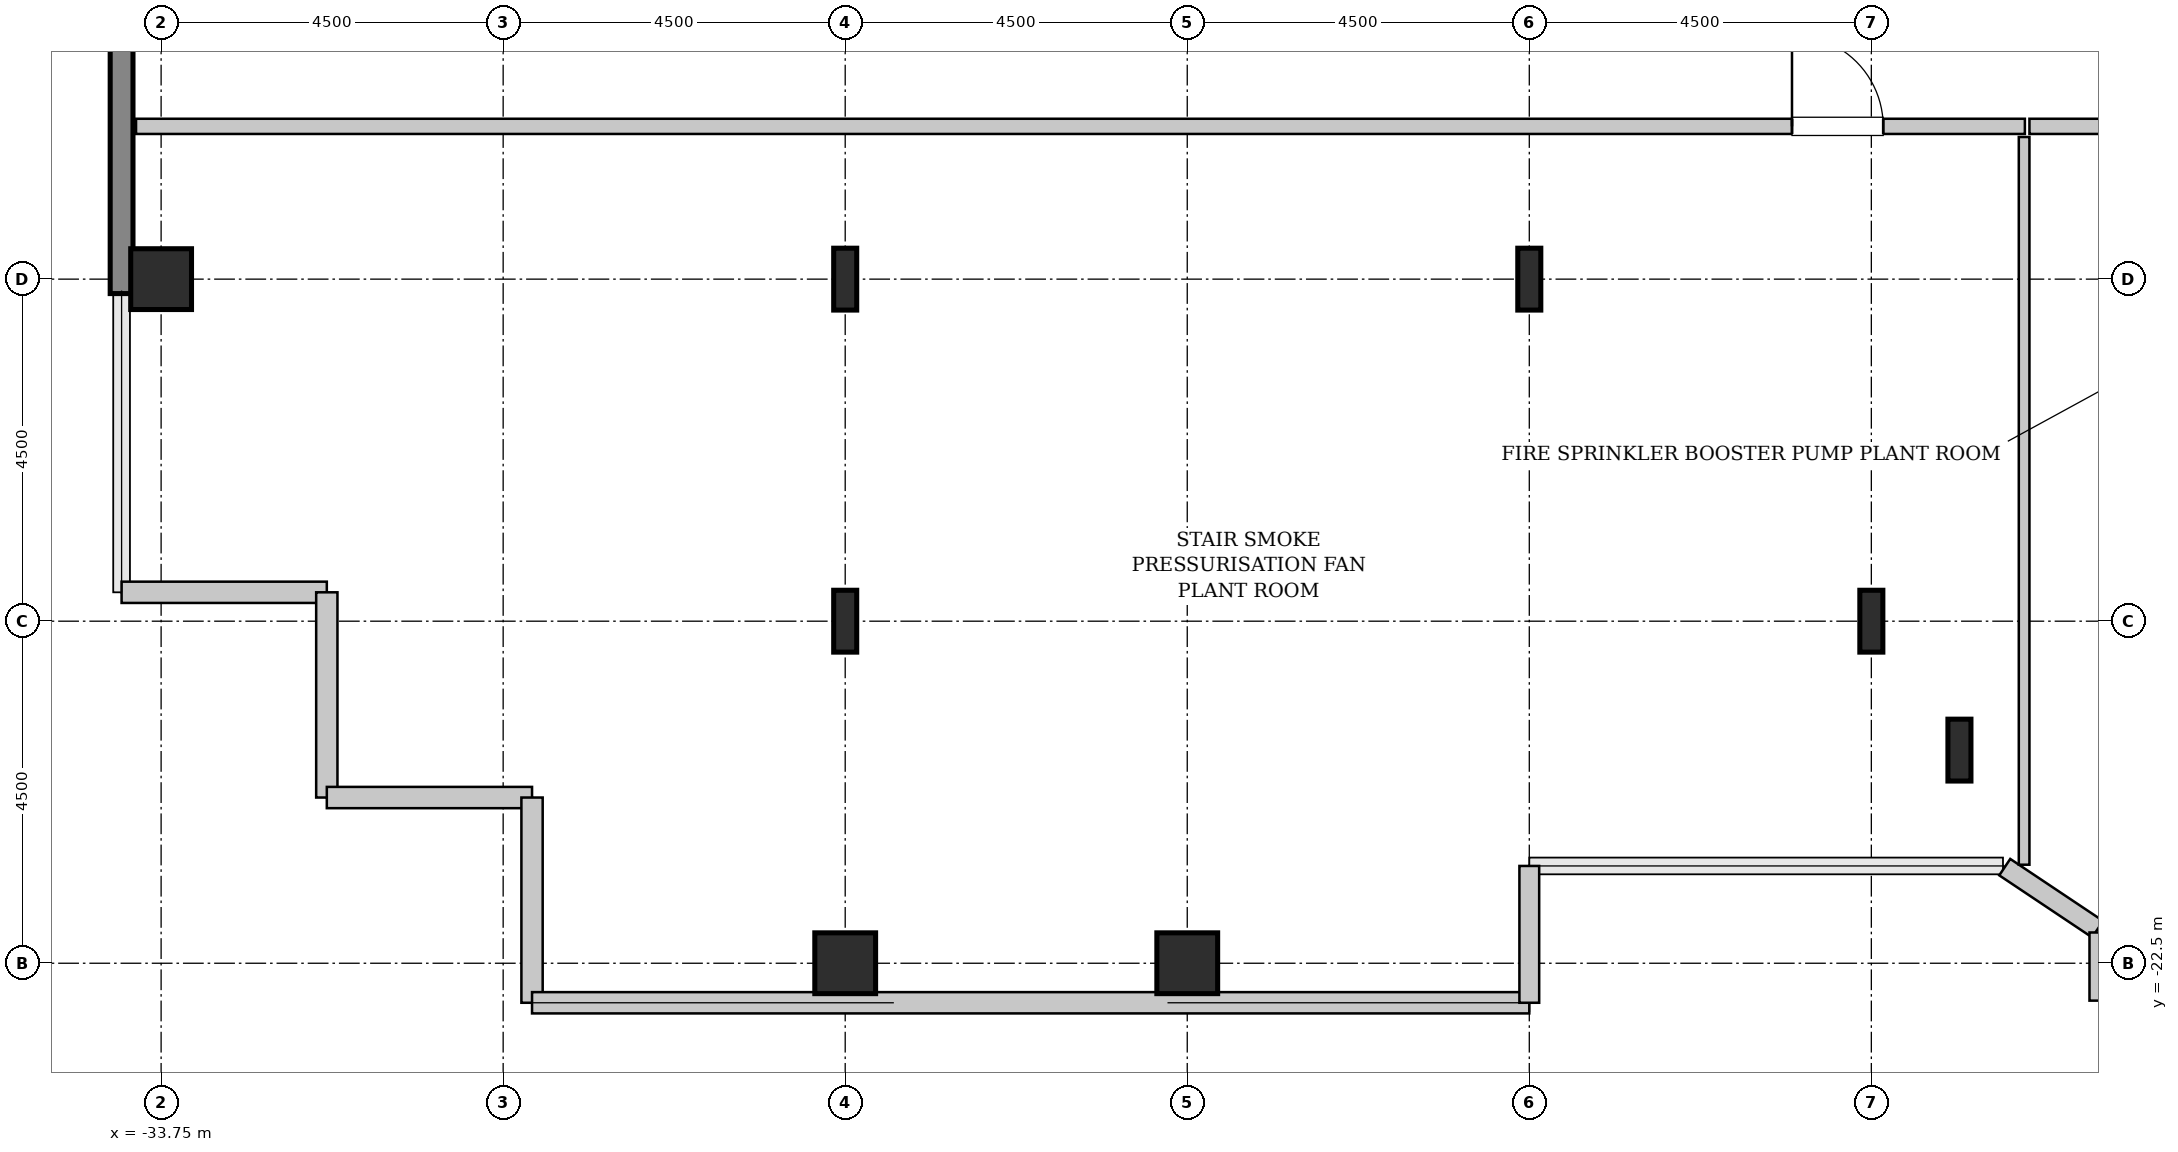
"""IFC4 building model, lengths in metres.
Left out: names, types, materials, properties, quantities, classifications, styles, units other than length and angle.
Written with IfcOpenShell. Run it as: python <this file> out.ifc"""

import sys

from ifc_helpers import new_model, si_unit, direction, frame, frame_2d, origin, origin_2d, place, context, subcontext, project, spatial, rectangle, hollow_rectangle, i_section, extrude, source, transform, mapped, element, fill, save


model = new_model("IFC4")
c1 = context("Model", 3, precision=1e-05, world=origin(), true_north=direction((0.0, 1.0)))
c2 = subcontext(c1, "Body", "Model", "MODEL_VIEW")
j1 = project(units=[si_unit("LENGTHUNIT", "METRE"), si_unit("PLANEANGLEUNIT", "RADIAN")], contexts=[c1])
p1 = place(None, origin())
s1 = spatial("IfcSite", under=j1, at=p1, CompositionType="ELEMENT")
p2 = place(p1, origin())
s2 = spatial("IfcBuilding", under=s1, at=p2, CompositionType="ELEMENT")
p3 = place(p2, frame((0.0, 0.0, 202.0)))
s3 = spatial("IfcBuildingStorey", under=s2, at=p3, CompositionType="ELEMENT", Elevation=202.0)
m1 = source(origin(), c2, "Body", "SweptSolid", [
    extrude(hollow_rectangle(XDim=0.8, YDim=0.8, WallThickness=0.04, InnerFilletRadius=0.04, OuterFilletRadius=0.08, at=origin_2d()), origin(), (0.0, 0.0, 1.0), 4.6),
])
for number, where, z_axis, x_axis in (
    (1, (-33.75, -13.5, 0.0), (0.0, 0.0, 1.0), (1.0, 0.0, 0.0)),
    (2, (-24.75, -22.5, 0.0), (0.0, 0.0, 1.0), (1.0, 0.0, 0.0)),
):
    element("IfcColumn", number, at=place(p3, frame(where, z_axis=z_axis, x_axis=x_axis)), inside=s3, PredefinedType="COLUMN", context=c2, shape_type="MappedRepresentation", body=[
        mapped(m1, transform((0.0, 0.0, 0.0), x_axis=(1.0, 0.0, 0.0), y_axis=(0.0, 1.0, 0.0), z_axis=(0.0, 0.0, 1.0), scale=1.0)),
    ])
m2 = source(origin(), c2, "Body", "SweptSolid", [
    extrude(i_section(OverallWidth=0.303, OverallDepth=0.814, WebThickness=0.021, FlangeThickness=0.04, FilletRadius=0.03, at=origin_2d()), origin(), (0.0, 0.0, 1.0), 4.6),
])
for number, where, z_axis, x_axis in (
    (3, (-24.75, -18.0, 0.0), (0.0, 0.0, 1.0), (1.0, 0.0, 0.0)),
    (4, (-24.75, -13.5, 0.0), (0.0, 0.0, 1.0), (1.0, 0.0, 0.0)),
):
    element("IfcColumn", number, at=place(p3, frame(where, z_axis=z_axis, x_axis=x_axis)), inside=s3, PredefinedType="COLUMN", context=c2, shape_type="MappedRepresentation", body=[
        mapped(m2, transform((0.0, 0.0, 0.0), x_axis=(1.0, 0.0, 0.0), y_axis=(0.0, 1.0, 0.0), z_axis=(0.0, 0.0, 1.0), scale=1.0)),
    ])
p4 = place(p3, frame((-20.25, -22.5, 0.0), z_axis=(0.0, 0.0, 1.0), x_axis=(1.0, 0.0, 0.0)))
e5 = element("IfcColumn", 5, at=p4, inside=s3, PredefinedType="COLUMN", context=c2, shape_type="MappedRepresentation", body=[
    mapped(m1, transform((0.0, 0.0, 0.0), x_axis=(1.0, 0.0, 0.0), y_axis=(0.0, 1.0, 0.0), z_axis=(0.0, 0.0, 1.0), scale=1.0)),
])
for number, where, z_axis, x_axis in (
    (6, (-15.75, -13.5, 0.0), (0.0, 0.0, 1.0), (1.0, 0.0, 0.0)),
    (7, (-11.25, -18.0, 0.0), (0.0, 0.0, 1.0), (1.0, 0.0, 0.0)),
    (8, (-10.091, -19.696, 0.0), (0.0, 0.0, 1.0), (1.0, 0.0, 0.0)),
):
    element("IfcColumn", number, at=place(p3, frame(where, z_axis=z_axis, x_axis=x_axis)), inside=s3, PredefinedType="COLUMN", context=c2, shape_type="MappedRepresentation", body=[
        mapped(m2, transform((0.0, 0.0, 0.0), x_axis=(1.0, 0.0, 0.0), y_axis=(0.0, 1.0, 0.0), z_axis=(0.0, 0.0, 1.0), scale=1.0)),
    ])
m3 = source(origin(), c2, "Body", "SweptSolid", [
    extrude(rectangle(XDim=9.38, YDim=0.3, at=frame_2d((4.69, 0.0))), origin(), (0.0, 0.0, 1.0), 4.35),
])
p5 = place(p3, frame((-34.27, -13.69, 0.0), z_axis=(0.0, 0.0, 1.0), x_axis=(0.0, 1.0, 0.0)))
e9 = element("IfcWall", 9, at=p5, inside=s3, PredefinedType="SHEAR", context=c2, shape_type="MappedRepresentation", body=[
    mapped(m3, transform((0.0, 0.0, 0.0), x_axis=(1.0, 0.0, 0.0), y_axis=(0.0, 1.0, 0.0), z_axis=(0.0, 0.0, 1.0), scale=1.0)),
])
m4 = source(origin(), c2, "Body", "SweptSolid", [
    extrude(rectangle(XDim=2.7, YDim=0.28, at=frame_2d((1.35, 0.0))), origin(), (0.0, 0.0, 1.0), 4.35),
])
for number, where, z_axis, x_axis in (
    (10, (-34.27, -17.62, 0.0), (0.0, 0.0, 1.0), (1.0, 0.0, 0.0)),
    (11, (-31.57, -17.62, 0.0), (0.0, 0.0, 1.0), (0.0, -1.0, 0.0)),
    (12, (-31.57, -20.32, 0.0), (0.0, 0.0, 1.0), (1.0, 0.0, 0.0)),
    (13, (-28.87, -20.32, 0.0), (0.0, 0.0, 1.0), (0.0, -1.0, 0.0)),
):
    element("IfcWall", number, at=place(p3, frame(where, z_axis=z_axis, x_axis=x_axis)), inside=s3, PredefinedType="SOLIDWALL", context=c2, shape_type="MappedRepresentation", body=[
        mapped(m4, transform((0.0, 0.0, 0.0), x_axis=(1.0, 0.0, 0.0), y_axis=(0.0, 1.0, 0.0), z_axis=(0.0, 0.0, 1.0), scale=1.0)),
    ])
m5 = source(origin(), c2, "Body", "SweptSolid", [
    extrude(rectangle(XDim=13.12, YDim=0.28, at=frame_2d((6.56, 0.0))), origin(), (0.0, 0.0, 1.0), 1.1),
])
p6 = place(p3, frame((-28.87, -23.02, 0.0), z_axis=(0.0, 0.0, 1.0), x_axis=(1.0, 0.0, 0.0)))
e14 = element("IfcWall", 14, at=p6, inside=s3, PredefinedType="SOLIDWALL", context=c2, shape_type="MappedRepresentation", body=[
    mapped(m5, transform((0.0, 0.0, 0.0), x_axis=(1.0, 0.0, 0.0), y_axis=(0.0, 1.0, 0.0), z_axis=(0.0, 0.0, 1.0), scale=1.0)),
])
m6 = source(origin(), c2, "Body", "SweptSolid", [
    extrude(rectangle(XDim=1.8, YDim=0.26, at=frame_2d((0.9, 0.0))), origin(), (0.0, 0.0, 1.0), 4.35),
])
p7 = place(p3, frame((-15.75, -23.02, 0.0), z_axis=(0.0, 0.0, 1.0), x_axis=(0.0, 1.0, 0.0)))
e15 = element("IfcWall", 15, at=p7, inside=s3, PredefinedType="SOLIDWALL", context=c2, shape_type="MappedRepresentation", body=[
    mapped(m6, transform((0.0, 0.0, 0.0), x_axis=(1.0, 0.0, 0.0), y_axis=(0.0, 1.0, 0.0), z_axis=(0.0, 0.0, 1.0), scale=1.0)),
])
m7 = source(origin(), c2, "Body", "SweptSolid", [
    extrude(rectangle(XDim=1.469, YDim=0.26, at=frame_2d((0.734, 0.0))), origin(), (0.0, 0.0, 1.0), 4.35),
])
p8 = place(p3, frame((-9.495, -21.236, 0.0), z_axis=(0.0, 0.0, 1.0), x_axis=(0.831461760506, -0.555581983884, 0.0)))
e16 = element("IfcWall", 16, at=p8, inside=s3, PredefinedType="SOLIDWALL", context=c2, shape_type="MappedRepresentation", body=[
    mapped(m7, transform((0.0, 0.0, 0.0), x_axis=(1.0, 0.0, 0.0), y_axis=(0.0, 1.0, 0.0), z_axis=(0.0, 0.0, 1.0), scale=1.0)),
])
m8 = source(origin(), c2, "Body", "SweptSolid", [
    extrude(rectangle(XDim=0.897, YDim=0.26, at=frame_2d((0.448, 0.0))), origin(), (0.0, 0.0, 1.0), 4.35),
])
p9 = place(p3, frame((-8.25, -22.095, 0.0), z_axis=(0.0, 0.0, 1.0), x_axis=(0.0, -1.0, 0.0)))
e17 = element("IfcWall", 17, at=p9, inside=s3, PredefinedType="SOLIDWALL", context=c2, shape_type="MappedRepresentation", body=[
    mapped(m8, transform((0.0, 0.0, 0.0), x_axis=(1.0, 0.0, 0.0), y_axis=(0.0, 1.0, 0.0), z_axis=(0.0, 0.0, 1.0), scale=1.0)),
])
m9 = source(origin(), c2, "Body", "SweptSolid", [
    extrude(rectangle(XDim=24.85, YDim=0.2, at=frame_2d((12.425, 0.0))), origin(), (0.0, 0.0, 1.0), 4.335),
])
p10 = place(p3, frame((-34.08, -11.49, 0.0), z_axis=(0.0, 0.0, 1.0), x_axis=(1.0, 0.0, 0.0)))
e18 = element("IfcWall", 18, at=p10, inside=s3, PredefinedType="SOLIDWALL", context=c2, shape_type="MappedRepresentation", body=[
    mapped(m9, transform((0.0, 0.0, 0.0), x_axis=(1.0, 0.0, 0.0), y_axis=(0.0, 1.0, 0.0), z_axis=(0.0, 0.0, 1.0), scale=1.0)),
])
p11 = place(p10, frame((21.786, 0.0, 0.0)))
e19 = element("IfcOpeningElement", 19, at=p11, cuts=e18, PredefinedType="OPENING", context=c2, shape_type="SweptSolid", body=[
    extrude(rectangle(XDim=1.2, YDim=2.15, at=frame_2d((0.6, 1.075))), frame((0.0, 0.11, 0.0), z_axis=(0.0, -1.0, 0.0), x_axis=(1.0, 0.0, 0.0)), (0.0, 0.0, 1.0), 0.22),
])
m10 = source(origin(), c2, "Body", "SweptSolid", [
    extrude(rectangle(XDim=9.574, YDim=0.14, at=frame_2d((4.787, 0.0))), origin(), (0.0, 0.0, 1.0), 4.335),
])
p12 = place(p3, frame((-9.24, -21.204, 0.0), z_axis=(0.0, 0.0, 1.0), x_axis=(0.0, 1.0, 0.0)))
e20 = element("IfcWall", 20, at=p12, inside=s3, PredefinedType="PARTITIONING", context=c2, shape_type="MappedRepresentation", body=[
    mapped(m10, transform((0.0, 0.0, 0.0), x_axis=(1.0, 0.0, 0.0), y_axis=(0.0, 1.0, 0.0), z_axis=(0.0, 0.0, 1.0), scale=1.0)),
])
m11 = source(origin(), c2, "Body", "SweptSolid", [
    extrude(rectangle(XDim=4.54, YDim=0.2, at=frame_2d((2.27, 0.0))), origin(), (0.0, 0.0, 1.0), 4.335),
])
p13 = place(p3, frame((-9.17, -11.49, 0.0), z_axis=(0.0, 0.0, 1.0), x_axis=(1.0, 0.0, 0.0)))
e21 = element("IfcWall", 21, at=p13, inside=s3, PredefinedType="SOLIDWALL", context=c2, shape_type="MappedRepresentation", body=[
    mapped(m11, transform((0.0, 0.0, 0.0), x_axis=(1.0, 0.0, 0.0), y_axis=(0.0, 1.0, 0.0), z_axis=(0.0, 0.0, 1.0), scale=1.0)),
])
p14 = place(p13, frame((1.67, 0.0, 0.0)))
e22 = element("IfcOpeningElement", 22, at=p14, cuts=e21, PredefinedType="OPENING", context=c2, shape_type="SweptSolid", body=[
    extrude(rectangle(XDim=1.2, YDim=2.15, at=frame_2d((0.6, 1.075))), frame((0.0, 0.11, 0.0), z_axis=(0.0, -1.0, 0.0), x_axis=(1.0, 0.0, 0.0)), (0.0, 0.0, 1.0), 0.22),
])
m12 = source(origin(), c2, "Body", "SweptSolid", [
    extrude(rectangle(XDim=1.2, YDim=2.15, at=frame_2d((0.6, 1.075))), frame((0.0, 0.025, 0.0), z_axis=(0.0, -1.0, 0.0), x_axis=(1.0, 0.0, 0.0)), (0.0, 0.0, 1.0), 0.05),
])
p15 = place(p11, origin())
e23 = element("IfcDoor", 23, at=p15, inside=s3, OperationType="SINGLE_SWING_LEFT", PredefinedType="DOOR", context=c2, shape_type="MappedRepresentation", body=[
    mapped(m12, transform((0.0, 0.0, 0.0), x_axis=(1.0, 0.0, 0.0), y_axis=(0.0, 1.0, 0.0), z_axis=(0.0, 0.0, 1.0), scale=1.0)),
])
fill(e19, e23)
save(model, sys.argv[1])
